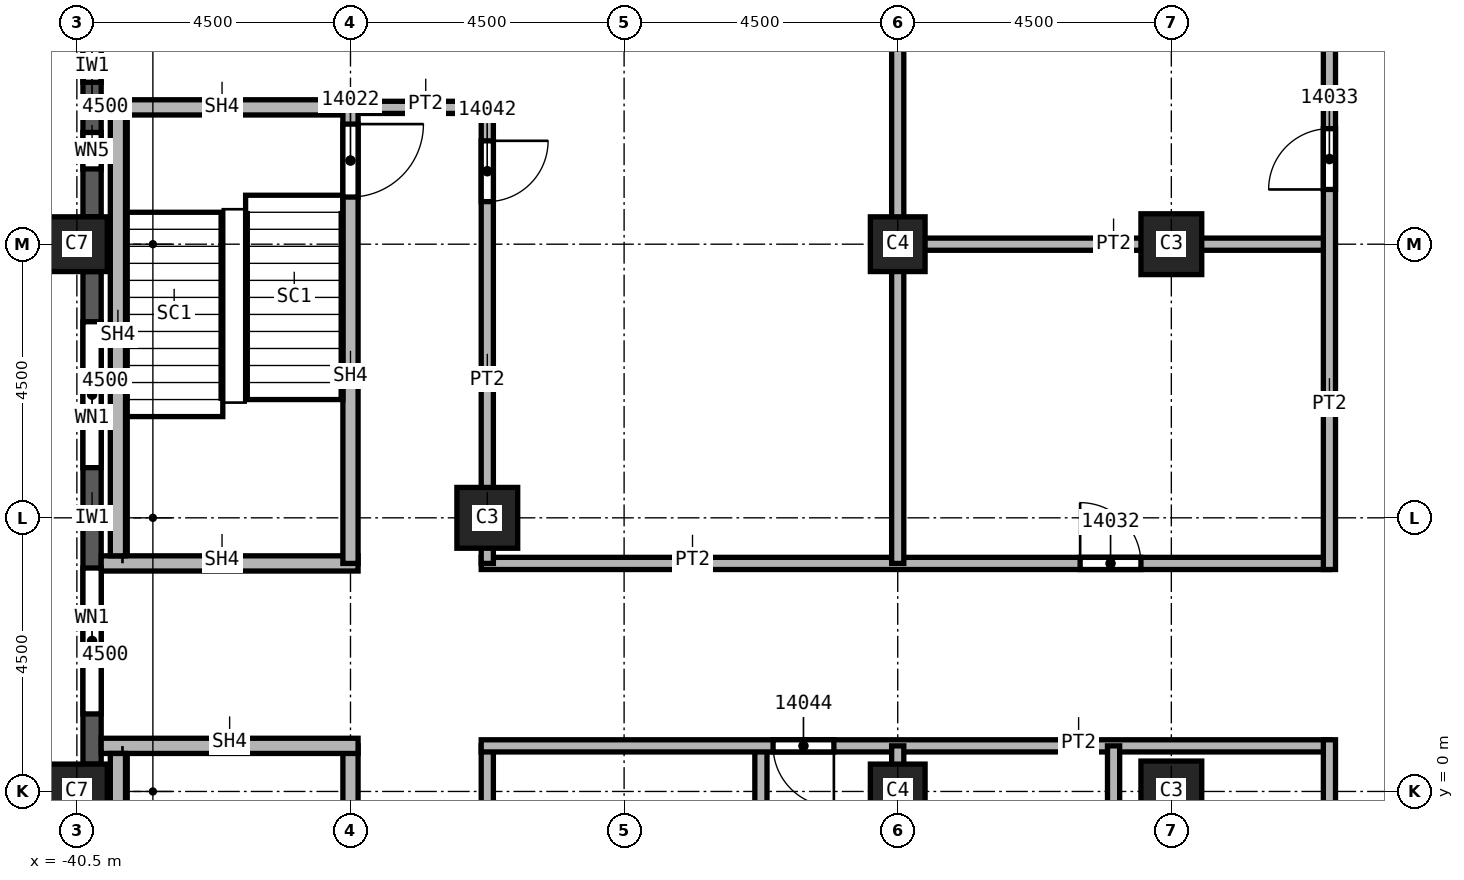
"""IFC4 building model, lengths in metres.
Left out: names, types, materials, properties, quantities, classifications, styles, units other than length and angle.
Written with IfcOpenShell. Run it as: python <this file> out.ifc"""

import sys

from ifc_helpers import new_model, si_unit, direction, frame, frame_2d, origin, origin_2d, place, context, subcontext, project, spatial, rectangle, extrude, element, fill, save


model = new_model("IFC4")
c1 = context("Model", 3, precision=1e-05, world=origin(), true_north=direction((0.0, 1.0)))
c2 = subcontext(c1, "Body", "Model", "MODEL_VIEW")
j1 = project(units=[si_unit("LENGTHUNIT", "METRE"), si_unit("PLANEANGLEUNIT", "RADIAN")], contexts=[c1])
p1 = place(None, origin())
s1 = spatial("IfcSite", under=j1, at=p1, CompositionType="ELEMENT")
p2 = place(p1, origin())
s2 = spatial("IfcBuilding", under=s1, at=p2, CompositionType="ELEMENT")
p3 = place(p2, frame((0.0, 0.0, 224.0)))
s3 = spatial("IfcBuildingStorey", under=s2, at=p3, CompositionType="ELEMENT", Elevation=224.0)
for number, where, z_axis, x_axis in (
    (1, (-40.5, 0.0, 0.0), (0.0, 0.0, 1.0), (0.0, 1.0, 0.0)),
    (2, (-40.5, 9.0, 0.0), (0.0, 0.0, 1.0), (0.0, 1.0, 0.0)),
):
    element("IfcColumn", number, at=place(p3, frame(where, z_axis=z_axis, x_axis=x_axis)), inside=s3, PredefinedType="COLUMN", context=c2, shape_type="SweptSolid", body=[
        extrude(rectangle(XDim=0.9, YDim=1.0, at=origin_2d()), origin(), (0.0, 0.0, 1.0), 3.72),
    ])
for number, where, z_axis, x_axis in (
    (3, (-33.75, 4.5, 0.0), (0.0, 0.0, 1.0), (1.0, 0.0, 0.0)),
    (4, (-22.5, 0.0, 0.0), (0.0, 0.0, 1.0), (1.0, 0.0, 0.0)),
    (5, (-22.5, 9.0, 0.0), (0.0, 0.0, 1.0), (1.0, 0.0, 0.0)),
):
    element("IfcColumn", number, at=place(p3, frame(where, z_axis=z_axis, x_axis=x_axis)), inside=s3, PredefinedType="COLUMN", context=c2, shape_type="SweptSolid", body=[
        extrude(rectangle(XDim=1.0, YDim=1.0, at=origin_2d()), origin(), (0.0, 0.0, 1.0), 3.72),
    ])
for number, where, z_axis, x_axis in (
    (6, (-27.0, 0.0, 0.0), (0.0, 0.0, 1.0), (1.0, 0.0, 0.0)),
    (7, (-27.0, 9.0, 0.0), (0.0, 0.0, 1.0), (1.0, 0.0, 0.0)),
):
    element("IfcColumn", number, at=place(p3, frame(where, z_axis=z_axis, x_axis=x_axis)), inside=s3, PredefinedType="COLUMN", context=c2, shape_type="SweptSolid", body=[
        extrude(rectangle(XDim=0.9, YDim=0.9, at=origin_2d()), origin(), (0.0, 0.0, 1.0), 3.72),
    ])
p4 = place(p3, frame((-40.25, 13.05, 0.0), z_axis=(0.0, 0.0, 1.0), x_axis=(0.0, -1.0, 0.0)))
e8 = element("IfcWall", 8, at=p4, inside=s3, PredefinedType="SOLIDWALL", context=c2, shape_type="SweptSolid", body=[
    extrude(rectangle(XDim=3.6, YDim=0.3, at=frame_2d((1.8, 0.0))), origin(), (0.0, 0.0, 1.0), 3.12),
])
p5 = place(p4, frame((0.788, 0.0, 0.8)))
e9 = element("IfcOpeningElement", 9, at=p5, cuts=e8, PredefinedType="OPENING", context=c2, shape_type="SweptSolid", body=[
    extrude(rectangle(XDim=0.6, YDim=1.95, at=frame_2d((0.3, 0.975))), frame((0.0, 0.15, 0.0), z_axis=(0.0, -1.0, 0.0), x_axis=(1.0, 0.0, 0.0)), (0.0, 0.0, 1.0), 0.3),
])
p6 = place(p4, frame((2.212, 0.0, 0.8)))
e10 = element("IfcOpeningElement", 10, at=p6, cuts=e8, PredefinedType="OPENING", context=c2, shape_type="SweptSolid", body=[
    extrude(rectangle(XDim=0.6, YDim=1.95, at=frame_2d((0.3, 0.975))), frame((0.0, 0.15, 0.0), z_axis=(0.0, -1.0, 0.0), x_axis=(1.0, 0.0, 0.0)), (0.0, 0.0, 1.0), 0.3),
])
p7 = place(p3, frame((-40.25, 8.55, 0.0), z_axis=(0.0, 0.0, 1.0), x_axis=(0.0, -1.0, 0.0)))
e11 = element("IfcWall", 11, at=p7, inside=s3, PredefinedType="SOLIDWALL", context=c2, shape_type="SweptSolid", body=[
    extrude(rectangle(XDim=8.1, YDim=0.3, at=frame_2d((4.05, 0.0))), origin(), (0.0, 0.0, 1.0), 3.12),
])
p8 = place(p7, frame((0.825, 0.0, 0.8)))
e12 = element("IfcOpeningElement", 12, at=p8, cuts=e11, PredefinedType="OPENING", context=c2, shape_type="SweptSolid", body=[
    extrude(rectangle(XDim=2.4, YDim=1.95, at=frame_2d((1.2, 0.975))), frame((0.0, 0.15, 0.0), z_axis=(0.0, -1.0, 0.0), x_axis=(1.0, 0.0, 0.0)), (0.0, 0.0, 1.0), 0.3),
])
p9 = place(p7, frame((4.875, 0.0, 0.8)))
e13 = element("IfcOpeningElement", 13, at=p9, cuts=e11, PredefinedType="OPENING", context=c2, shape_type="SweptSolid", body=[
    extrude(rectangle(XDim=2.4, YDim=1.95, at=frame_2d((1.2, 0.975))), frame((0.0, 0.15, 0.0), z_axis=(0.0, -1.0, 0.0), x_axis=(1.0, 0.0, 0.0)), (0.0, 0.0, 1.0), 0.3),
])
p10 = place(p3, frame((-36.0, 11.25, 0.0), z_axis=(0.0, 0.0, 1.0), x_axis=(1.0, 0.0, 0.0)))
e14 = element("IfcWall", 14, at=p10, inside=s3, PredefinedType="PARTITIONING", context=c2, shape_type="SweptSolid", body=[
    extrude(rectangle(XDim=2.35, YDim=0.2, at=frame_2d((1.175, 0.0))), origin(), (0.0, 0.0, 1.0), 3.72),
])
p11 = place(p3, frame((-33.85, 3.75, 0.0), z_axis=(0.0, 0.0, 1.0), x_axis=(1.0, 0.0, 0.0)))
e15 = element("IfcWall", 15, at=p11, inside=s3, PredefinedType="PARTITIONING", context=c2, shape_type="SweptSolid", body=[
    extrude(rectangle(XDim=13.95, YDim=0.2, at=frame_2d((6.975, 0.0))), origin(), (0.0, 0.0, 1.0), 3.72),
])
p12 = place(p11, frame((9.85, 0.0, 0.0)))
e16 = element("IfcOpeningElement", 16, at=p12, cuts=e15, PredefinedType="OPENING", context=c2, shape_type="SweptSolid", body=[
    extrude(rectangle(XDim=1.0, YDim=2.1, at=frame_2d((0.5, 1.05))), frame((0.0, 0.1, 0.0), z_axis=(0.0, -1.0, 0.0), x_axis=(1.0, 0.0, 0.0)), (0.0, 0.0, 1.0), 0.2),
])
p13 = place(p3, frame((-33.75, 0.75, 0.0), z_axis=(0.0, 0.0, 1.0), x_axis=(0.0, -1.0, 0.0)))
e17 = element("IfcWall", 17, at=p13, inside=s3, PredefinedType="PARTITIONING", context=c2, shape_type="SweptSolid", body=[
    extrude(rectangle(XDim=7.6, YDim=0.2, at=frame_2d((3.8, 0.0))), origin(), (0.0, 0.0, 1.0), 3.72),
])
p14 = place(p13, frame((6.1, 0.0, 0.0)))
e18 = element("IfcOpeningElement", 18, at=p14, cuts=e17, PredefinedType="OPENING", context=c2, shape_type="SweptSolid", body=[
    extrude(rectangle(XDim=1.0, YDim=2.1, at=frame_2d((0.5, 1.05))), frame((0.0, 0.1, 0.0), z_axis=(0.0, -1.0, 0.0), x_axis=(1.0, 0.0, 0.0)), (0.0, 0.0, 1.0), 0.2),
])
p15 = place(p3, frame((-33.75, 11.25, 0.0), z_axis=(0.0, 0.0, 1.0), x_axis=(0.0, -1.0, 0.0)))
e19 = element("IfcWall", 19, at=p15, inside=s3, PredefinedType="PARTITIONING", context=c2, shape_type="SweptSolid", body=[
    extrude(rectangle(XDim=7.5, YDim=0.2, at=frame_2d((3.75, 0.0))), origin(), (0.0, 0.0, 1.0), 3.72),
])
p16 = place(p15, frame((0.55, 0.0, 0.0)))
e20 = element("IfcOpeningElement", 20, at=p16, cuts=e19, PredefinedType="OPENING", context=c2, shape_type="SweptSolid", body=[
    extrude(rectangle(XDim=1.0, YDim=2.1, at=frame_2d((0.5, 1.05))), frame((0.0, 0.1, 0.0), z_axis=(0.0, -1.0, 0.0), x_axis=(1.0, 0.0, 0.0)), (0.0, 0.0, 1.0), 0.2),
])
p17 = place(p3, frame((-29.25, 0.75, 0.0), z_axis=(0.0, 0.0, 1.0), x_axis=(0.0, -1.0, 0.0)))
e21 = element("IfcWall", 21, at=p17, inside=s3, PredefinedType="PARTITIONING", context=c2, shape_type="SweptSolid", body=[
    extrude(rectangle(XDim=18.35, YDim=0.2, at=frame_2d((9.175, 0.0))), origin(), (0.0, 0.0, 1.0), 3.72),
])
p18 = place(p3, frame((-19.9, 0.75, 0.0), z_axis=(0.0, 0.0, 1.0), x_axis=(-1.0, 0.0, 0.0)))
e22 = element("IfcWall", 22, at=p18, inside=s3, PredefinedType="PARTITIONING", context=c2, shape_type="SweptSolid", body=[
    extrude(rectangle(XDim=13.95, YDim=0.2, at=frame_2d((6.975, 0.0))), origin(), (0.0, 0.0, 1.0), 3.72),
])
p19 = place(p18, frame((8.15, 0.0, 0.0)))
e23 = element("IfcOpeningElement", 23, at=p19, cuts=e22, PredefinedType="OPENING", context=c2, shape_type="SweptSolid", body=[
    extrude(rectangle(XDim=1.0, YDim=2.1, at=frame_2d((0.5, 1.05))), frame((0.0, 0.1, 0.0), z_axis=(0.0, -1.0, 0.0), x_axis=(1.0, 0.0, 0.0)), (0.0, 0.0, 1.0), 0.2),
])
p20 = place(p3, frame((-27.1, 9.0, 0.0), z_axis=(0.0, 0.0, 1.0), x_axis=(1.0, 0.0, 0.0)))
e24 = element("IfcWall", 24, at=p20, inside=s3, PredefinedType="PARTITIONING", context=c2, shape_type="SweptSolid", body=[
    extrude(rectangle(XDim=7.2, YDim=0.2, at=frame_2d((3.6, 0.0))), origin(), (0.0, 0.0, 1.0), 3.72),
])
p21 = place(p3, frame((-27.0, -17.5, 0.0), z_axis=(0.0, 0.0, 1.0), x_axis=(0.0, 1.0, 0.0)))
e25 = element("IfcWall", 25, at=p21, inside=s3, PredefinedType="PARTITIONING", context=c2, shape_type="SweptSolid", body=[
    extrude(rectangle(XDim=18.25, YDim=0.2, at=frame_2d((9.125, 0.0))), origin(), (0.0, 0.0, 1.0), 3.72),
])
p22 = place(p3, frame((-27.0, 3.75, 0.0), z_axis=(0.0, 0.0, 1.0), x_axis=(0.0, 1.0, 0.0)))
e26 = element("IfcWall", 26, at=p22, inside=s3, PredefinedType="PARTITIONING", context=c2, shape_type="SweptSolid", body=[
    extrude(rectangle(XDim=13.75, YDim=0.2, at=frame_2d((6.875, 0.0))), origin(), (0.0, 0.0, 1.0), 3.72),
])
p23 = place(p3, frame((-23.45, -19.9, 0.0), z_axis=(0.0, 0.0, 1.0), x_axis=(0.0, 1.0, 0.0)))
e27 = element("IfcWall", 27, at=p23, inside=s3, PredefinedType="PARTITIONING", context=c2, shape_type="SweptSolid", body=[
    extrude(rectangle(XDim=20.65, YDim=0.2, at=frame_2d((10.325, 0.0))), origin(), (0.0, 0.0, 1.0), 3.72),
])
p24 = place(p23, frame((2.65, 0.0, 0.0)))
e28 = element("IfcOpeningElement", 28, at=p24, cuts=e27, PredefinedType="OPENING", context=c2, shape_type="SweptSolid", body=[
    extrude(rectangle(XDim=1.0, YDim=2.1, at=frame_2d((0.5, 1.05))), frame((0.0, 0.1, 0.0), z_axis=(0.0, -1.0, 0.0), x_axis=(1.0, 0.0, 0.0)), (0.0, 0.0, 1.0), 0.2),
])
p25 = place(p23, frame((17.0, 0.0, 0.0)))
e29 = element("IfcOpeningElement", 29, at=p25, cuts=e27, PredefinedType="OPENING", context=c2, shape_type="SweptSolid", body=[
    extrude(rectangle(XDim=1.0, YDim=2.1, at=frame_2d((0.5, 1.05))), frame((0.0, 0.1, 0.0), z_axis=(0.0, -1.0, 0.0), x_axis=(1.0, 0.0, 0.0)), (0.0, 0.0, 1.0), 0.2),
])
p26 = place(p3, frame((-19.9, -22.4, 0.0), z_axis=(0.0, 0.0, 1.0), x_axis=(0.0, 1.0, 0.0)))
e30 = element("IfcWall", 30, at=p26, inside=s3, PredefinedType="PARTITIONING", context=c2, shape_type="SweptSolid", body=[
    extrude(rectangle(XDim=23.25, YDim=0.2, at=frame_2d((11.625, 0.0))), origin(), (0.0, 0.0, 1.0), 3.72),
])
p27 = place(p26, frame((4.45, 0.0, 0.0)))
e31 = element("IfcOpeningElement", 31, at=p27, cuts=e30, PredefinedType="OPENING", context=c2, shape_type="SweptSolid", body=[
    extrude(rectangle(XDim=1.0, YDim=2.1, at=frame_2d((0.5, 1.05))), frame((0.0, 0.1, 0.0), z_axis=(0.0, -1.0, 0.0), x_axis=(1.0, 0.0, 0.0)), (0.0, 0.0, 1.0), 0.2),
])
p28 = place(p26, frame((20.45, 0.0, 0.0)))
e32 = element("IfcOpeningElement", 32, at=p28, cuts=e30, PredefinedType="OPENING", context=c2, shape_type="SweptSolid", body=[
    extrude(rectangle(XDim=1.0, YDim=2.1, at=frame_2d((0.5, 1.05))), frame((0.0, 0.1, 0.0), z_axis=(0.0, -1.0, 0.0), x_axis=(1.0, 0.0, 0.0)), (0.0, 0.0, 1.0), 0.2),
])
p29 = place(p3, frame((-19.9, 3.65, 0.0), z_axis=(0.0, 0.0, 1.0), x_axis=(0.0, 1.0, 0.0)))
e33 = element("IfcWall", 33, at=p29, inside=s3, PredefinedType="PARTITIONING", context=c2, shape_type="SweptSolid", body=[
    extrude(rectangle(XDim=9.95, YDim=0.2, at=frame_2d((4.975, 0.0))), origin(), (0.0, 0.0, 1.0), 3.72),
])
p30 = place(p29, frame((6.25, 0.0, 0.0)))
e34 = element("IfcOpeningElement", 34, at=p30, cuts=e33, PredefinedType="OPENING", context=c2, shape_type="SweptSolid", body=[
    extrude(rectangle(XDim=1.0, YDim=2.1, at=frame_2d((0.5, 1.05))), frame((0.0, 0.1, 0.0), z_axis=(0.0, -1.0, 0.0), x_axis=(1.0, 0.0, 0.0)), (0.0, 0.0, 1.0), 0.2),
])
p31 = place(p3, frame((-40.1, 3.75, 0.0), z_axis=(0.0, 0.0, 1.0), x_axis=(1.0, 0.0, 0.0)))
e35 = element("IfcWall", 35, at=p31, inside=s3, PredefinedType="SOLIDWALL", context=c2, shape_type="SweptSolid", body=[
    extrude(rectangle(XDim=4.225, YDim=0.25, at=frame_2d((2.113, 0.0))), origin(), (0.0, 0.0, 1.0), 3.72),
])
p32 = place(p3, frame((-40.1, 11.25, 0.0), z_axis=(0.0, 0.0, 1.0), x_axis=(1.0, 0.0, 0.0)))
e36 = element("IfcWall", 36, at=p32, inside=s3, PredefinedType="SOLIDWALL", context=c2, shape_type="SweptSolid", body=[
    extrude(rectangle(XDim=4.1, YDim=0.25, at=frame_2d((2.05, 0.0))), origin(), (0.0, 0.0, 1.0), 3.72),
])
p33 = place(p3, frame((-36.0, 0.75, 0.0), z_axis=(0.0, 0.0, 1.0), x_axis=(0.0, -1.0, 0.0)))
e37 = element("IfcWall", 37, at=p33, inside=s3, PredefinedType="SOLIDWALL", context=c2, shape_type="SweptSolid", body=[
    extrude(rectangle(XDim=7.625, YDim=0.25, at=frame_2d((3.812, 0.0))), origin(), (0.0, 0.0, 1.0), 3.72),
])
p34 = place(p33, frame((5.95, 0.0, 0.0)))
e38 = element("IfcOpeningElement", 38, at=p34, cuts=e37, PredefinedType="OPENING", context=c2, shape_type="SweptSolid", body=[
    extrude(rectangle(XDim=1.2, YDim=2.1, at=frame_2d((0.6, 1.05))), frame((0.0, 0.125, 0.0), z_axis=(0.0, -1.0, 0.0), x_axis=(1.0, 0.0, 0.0)), (0.0, 0.0, 1.0), 0.25),
])
p35 = place(p3, frame((-36.0, 11.375, 0.0), z_axis=(0.0, 0.0, 1.0), x_axis=(0.0, -1.0, 0.0)))
e39 = element("IfcWall", 39, at=p35, inside=s3, PredefinedType="SOLIDWALL", context=c2, shape_type="SweptSolid", body=[
    extrude(rectangle(XDim=7.625, YDim=0.25, at=frame_2d((3.812, 0.0))), origin(), (0.0, 0.0, 1.0), 3.72),
])
p36 = place(p35, frame((0.4, 0.0, 0.0)))
e40 = element("IfcOpeningElement", 40, at=p36, cuts=e39, PredefinedType="OPENING", context=c2, shape_type="SweptSolid", body=[
    extrude(rectangle(XDim=1.2, YDim=2.1, at=frame_2d((0.6, 1.05))), frame((0.0, 0.125, 0.0), z_axis=(0.0, -1.0, 0.0), x_axis=(1.0, 0.0, 0.0)), (0.0, 0.0, 1.0), 0.25),
])
p37 = place(p3, frame((-35.875, 0.75, 0.0), z_axis=(0.0, 0.0, 1.0), x_axis=(-1.0, 0.0, 0.0)))
e41 = element("IfcWall", 41, at=p37, inside=s3, PredefinedType="SOLIDWALL", context=c2, shape_type="SweptSolid", body=[
    extrude(rectangle(XDim=4.225, YDim=0.25, at=frame_2d((2.113, 0.0))), origin(), (0.0, 0.0, 1.0), 3.72),
])
for number, where, z_axis, x_axis in (
    (42, (-39.825, 3.875, 0.0), (0.0, 0.0, 1.0), (0.0, 1.0, 0.0)),
    (43, (-39.825, -6.625, 0.0), (0.0, 0.0, 1.0), (0.0, 1.0, 0.0)),
):
    element("IfcWall", number, at=place(p3, frame(where, z_axis=z_axis, x_axis=x_axis)), inside=s3, PredefinedType="SOLIDWALL", context=c2, shape_type="SweptSolid", body=[
        extrude(rectangle(XDim=7.25, YDim=0.25, at=frame_2d((3.625, 0.0))), origin(), (0.0, 0.0, 1.0), 3.72),
    ])
p38 = place(p8, origin())
e44 = element("IfcWindow", 44, at=p38, inside=s3, PartitioningType="SINGLE_PANEL", PredefinedType="WINDOW", context=c2, shape_type="SweptSolid", body=[
    extrude(rectangle(XDim=2.4, YDim=1.95, at=frame_2d((1.2, 0.975))), frame((0.0, 0.03, 0.0), z_axis=(0.0, -1.0, 0.0), x_axis=(1.0, 0.0, 0.0)), (0.0, 0.0, 1.0), 0.06),
])
fill(e12, e44)
p39 = place(p9, origin())
e45 = element("IfcWindow", 45, at=p39, inside=s3, PartitioningType="SINGLE_PANEL", PredefinedType="WINDOW", context=c2, shape_type="SweptSolid", body=[
    extrude(rectangle(XDim=2.4, YDim=1.95, at=frame_2d((1.2, 0.975))), frame((0.0, 0.03, 0.0), z_axis=(0.0, -1.0, 0.0), x_axis=(1.0, 0.0, 0.0)), (0.0, 0.0, 1.0), 0.06),
])
fill(e13, e45)
p40 = place(p36, origin())
e46 = element("IfcDoor", 46, at=p40, inside=s3, OperationType="SINGLE_SWING_LEFT", PredefinedType="DOOR", context=c2, shape_type="SweptSolid", body=[
    extrude(rectangle(XDim=1.2, YDim=2.1, at=frame_2d((0.6, 1.05))), frame((0.0, 0.025, 0.0), z_axis=(0.0, -1.0, 0.0), x_axis=(1.0, 0.0, 0.0)), (0.0, 0.0, 1.0), 0.05),
])
fill(e40, e46)
p41 = place(p12, origin())
e47 = element("IfcDoor", 47, at=p41, inside=s3, OperationType="SINGLE_SWING_LEFT", PredefinedType="DOOR", context=c2, shape_type="SweptSolid", body=[
    extrude(rectangle(XDim=1.0, YDim=2.1, at=frame_2d((0.5, 1.05))), frame((0.0, 0.025, 0.0), z_axis=(0.0, -1.0, 0.0), x_axis=(1.0, 0.0, 0.0)), (0.0, 0.0, 1.0), 0.05),
])
fill(e16, e47)
p42 = place(p30, origin())
e48 = element("IfcDoor", 48, at=p42, inside=s3, OperationType="SINGLE_SWING_RIGHT", PredefinedType="DOOR", context=c2, shape_type="SweptSolid", body=[
    extrude(rectangle(XDim=1.0, YDim=2.1, at=frame_2d((0.5, 1.05))), frame((0.0, 0.025, 0.0), z_axis=(0.0, -1.0, 0.0), x_axis=(1.0, 0.0, 0.0)), (0.0, 0.0, 1.0), 0.05),
])
fill(e34, e48)
p43 = place(p16, origin())
e49 = element("IfcDoor", 49, at=p43, inside=s3, OperationType="SINGLE_SWING_LEFT", PredefinedType="DOOR", context=c2, shape_type="SweptSolid", body=[
    extrude(rectangle(XDim=1.0, YDim=2.1, at=frame_2d((0.5, 1.05))), frame((0.0, 0.025, 0.0), z_axis=(0.0, -1.0, 0.0), x_axis=(1.0, 0.0, 0.0)), (0.0, 0.0, 1.0), 0.05),
])
fill(e20, e49)
p44 = place(p19, origin())
e50 = element("IfcDoor", 50, at=p44, inside=s3, OperationType="SINGLE_SWING_LEFT", PredefinedType="DOOR", context=c2, shape_type="SweptSolid", body=[
    extrude(rectangle(XDim=1.0, YDim=2.1, at=frame_2d((0.5, 1.05))), frame((0.0, 0.025, 0.0), z_axis=(0.0, -1.0, 0.0), x_axis=(1.0, 0.0, 0.0)), (0.0, 0.0, 1.0), 0.05),
])
fill(e23, e50)
p45 = place(p5, origin())
e51 = element("IfcWindow", 51, at=p45, inside=s3, PartitioningType="SINGLE_PANEL", PredefinedType="WINDOW", context=c2, shape_type="SweptSolid", body=[
    extrude(rectangle(XDim=0.6, YDim=1.95, at=frame_2d((0.3, 0.975))), frame((0.0, 0.03, 0.0), z_axis=(0.0, -1.0, 0.0), x_axis=(1.0, 0.0, 0.0)), (0.0, 0.0, 1.0), 0.06),
])
fill(e9, e51)
p46 = place(p6, origin())
e52 = element("IfcWindow", 52, at=p46, inside=s3, PartitioningType="SINGLE_PANEL", PredefinedType="WINDOW", context=c2, shape_type="SweptSolid", body=[
    extrude(rectangle(XDim=0.6, YDim=1.95, at=frame_2d((0.3, 0.975))), frame((0.0, 0.03, 0.0), z_axis=(0.0, -1.0, 0.0), x_axis=(1.0, 0.0, 0.0)), (0.0, 0.0, 1.0), 0.06),
])
fill(e10, e52)
save(model, sys.argv[1])
